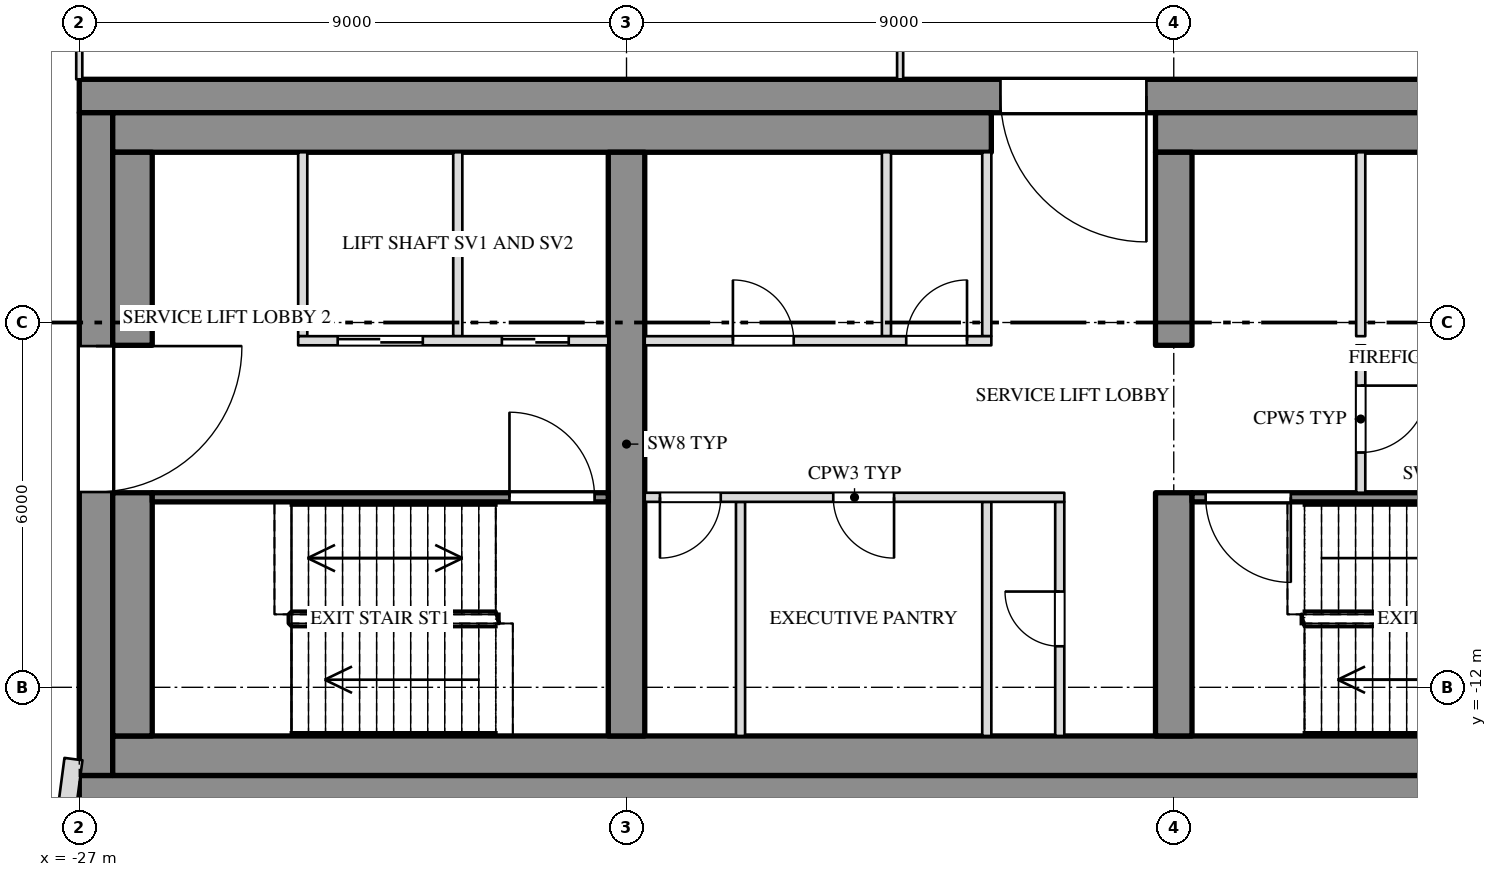
"""IFC4 building model, lengths in metres.
Left out: names, types, materials, properties, quantities, classifications, styles, units other than length and angle.
Written with IfcOpenShell. Run it as: python <this file> out.ifc"""

import sys

from ifc_helpers import new_model, si_unit, direction, frame, frame_2d, origin, place, context, subcontext, project, spatial, rectangle, extrude, element, fill, save


model = new_model("IFC4")
c1 = context("Model", 3, precision=1e-05, world=origin(), true_north=direction((0.0, 1.0)))
c2 = subcontext(c1, "Body", "Model", "MODEL_VIEW")
j1 = project(units=[si_unit("LENGTHUNIT", "METRE"), si_unit("PLANEANGLEUNIT", "RADIAN")], contexts=[c1])
p1 = place(None, origin())
s1 = spatial("IfcSite", under=j1, at=p1, CompositionType="ELEMENT")
p2 = place(p1, origin())
s2 = spatial("IfcBuilding", under=s1, at=p2, CompositionType="ELEMENT")
p3 = place(p2, frame((0.0, 0.0, 288.5)))
s3 = spatial("IfcBuildingStorey", under=s2, at=p3, CompositionType="ELEMENT", Elevation=288.5)
p4 = place(p3, frame((-27.0, -2.275, 0.0), z_axis=(0.0, 0.0, 1.0), x_axis=(1.0, 0.0, 0.0)))
e1 = element("IfcWall", 1, at=p4, inside=s3, PredefinedType="SHEAR", context=c2, shape_type="SweptSolid", body=[
    extrude(rectangle(XDim=54.0, YDim=0.55, at=frame_2d((27.0, 0.0))), origin(), (0.0, 0.0, 1.0), 3.78),
])
p5 = place(p4, frame((15.15, 0.0, 0.0)))
e2 = element("IfcOpeningElement", 2, at=p5, cuts=e1, PredefinedType="OPENING", context=c2, shape_type="SweptSolid", body=[
    extrude(rectangle(XDim=2.4, YDim=2.1, at=frame_2d((1.2, 1.05))), frame((0.0, 0.287, 0.0), z_axis=(0.0, -1.0, 0.0), x_axis=(1.0, 0.0, 0.0)), (0.0, 0.0, 1.0), 0.574),
])
p6 = place(p4, frame((36.45, 0.0, 0.0)))
e3 = element("IfcOpeningElement", 3, at=p6, cuts=e1, PredefinedType="OPENING", context=c2, shape_type="SweptSolid", body=[
    extrude(rectangle(XDim=2.4, YDim=2.1, at=frame_2d((1.2, 1.05))), frame((0.0, 0.287, 0.0), z_axis=(0.0, -1.0, 0.0), x_axis=(1.0, 0.0, 0.0)), (0.0, 0.0, 1.0), 0.574),
])
p7 = place(p3, frame((-27.0, -13.725, 0.0), z_axis=(0.0, 0.0, 1.0), x_axis=(1.0, 0.0, 0.0)))
e4 = element("IfcWall", 4, at=p7, inside=s3, PredefinedType="SHEAR", context=c2, shape_type="SweptSolid", body=[
    extrude(rectangle(XDim=54.0, YDim=0.55, at=frame_2d((27.0, 0.0))), origin(), (0.0, 0.0, 1.0), 3.78),
])
p8 = place(p3, frame((-26.725, -13.45, 0.0), z_axis=(0.0, 0.0, 1.0), x_axis=(0.0, 1.0, 0.0)))
e5 = element("IfcWall", 5, at=p8, inside=s3, PredefinedType="SHEAR", context=c2, shape_type="SweptSolid", body=[
    extrude(rectangle(XDim=10.9, YDim=0.55, at=frame_2d((5.45, 0.0))), origin(), (0.0, 0.0, 1.0), 3.78),
])
p9 = place(p8, frame((4.662, 0.0, 0.0)))
e6 = element("IfcOpeningElement", 6, at=p9, cuts=e5, PredefinedType="OPENING", context=c2, shape_type="SweptSolid", body=[
    extrude(rectangle(XDim=2.4, YDim=2.1, at=frame_2d((1.2, 1.05))), frame((0.0, 0.287, 0.0), z_axis=(0.0, -1.0, 0.0), x_axis=(1.0, 0.0, 0.0)), (0.0, 0.0, 1.0), 0.574),
])
p10 = place(p3, frame((-26.45, -2.875, 0.0), z_axis=(0.0, 0.0, 1.0), x_axis=(1.0, 0.0, 0.0)))
e7 = element("IfcWall", 7, at=p10, inside=s3, PredefinedType="SHEAR", context=c2, shape_type="SweptSolid", body=[
    extrude(rectangle(XDim=14.45, YDim=0.65, at=frame_2d((7.225, 0.0))), origin(), (0.0, 0.0, 1.0), 3.78),
])
p11 = place(p3, frame((-9.3, -2.875, 0.0), z_axis=(0.0, 0.0, 1.0), x_axis=(1.0, 0.0, 0.0)))
e8 = element("IfcWall", 8, at=p11, inside=s3, PredefinedType="SHEAR", context=c2, shape_type="SweptSolid", body=[
    extrude(rectangle(XDim=18.6, YDim=0.65, at=frame_2d((9.3, 0.0))), origin(), (0.0, 0.0, 1.0), 3.78),
])
p12 = place(p3, frame((-26.45, -13.125, 0.0), z_axis=(0.0, 0.0, 1.0), x_axis=(1.0, 0.0, 0.0)))
e9 = element("IfcWall", 9, at=p12, inside=s3, PredefinedType="SHEAR", context=c2, shape_type="SweptSolid", body=[
    extrude(rectangle(XDim=52.9, YDim=0.65, at=frame_2d((26.45, 0.0))), origin(), (0.0, 0.0, 1.0), 3.78),
])
p13 = place(p3, frame((-26.125, -12.8, 0.0), z_axis=(0.0, 0.0, 1.0), x_axis=(0.0, 1.0, 0.0)))
e10 = element("IfcWall", 10, at=p13, inside=s3, PredefinedType="SHEAR", context=c2, shape_type="SweptSolid", body=[
    extrude(rectangle(XDim=4.0, YDim=0.65, at=frame_2d((2.0, 0.0))), origin(), (0.0, 0.0, 1.0), 3.78),
])
p14 = place(p3, frame((-26.125, -6.375, 0.0), z_axis=(0.0, 0.0, 1.0), x_axis=(0.0, 1.0, 0.0)))
e11 = element("IfcWall", 11, at=p14, inside=s3, PredefinedType="SHEAR", context=c2, shape_type="SweptSolid", body=[
    extrude(rectangle(XDim=3.175, YDim=0.65, at=frame_2d((1.587, 0.0))), origin(), (0.0, 0.0, 1.0), 3.78),
])
p15 = place(p3, frame((-18.0, -12.8, 0.0), z_axis=(0.0, 0.0, 1.0), x_axis=(0.0, 1.0, 0.0)))
e12 = element("IfcWall", 12, at=p15, inside=s3, PredefinedType="SHEAR", context=c2, shape_type="SweptSolid", body=[
    extrude(rectangle(XDim=9.6, YDim=0.6, at=frame_2d((4.8, 0.0))), origin(), (0.0, 0.0, 1.0), 3.78),
])
p16 = place(p3, frame((-9.0, -12.8, 0.0), z_axis=(0.0, 0.0, 1.0), x_axis=(0.0, 1.0, 0.0)))
e13 = element("IfcWall", 13, at=p16, inside=s3, PredefinedType="SHEAR", context=c2, shape_type="SweptSolid", body=[
    extrude(rectangle(XDim=4.0, YDim=0.6, at=frame_2d((2.0, 0.0))), origin(), (0.0, 0.0, 1.0), 3.78),
])
p17 = place(p3, frame((-9.0, -6.375, 0.0), z_axis=(0.0, 0.0, 1.0), x_axis=(0.0, 1.0, 0.0)))
e14 = element("IfcWall", 14, at=p17, inside=s3, PredefinedType="SHEAR", context=c2, shape_type="SweptSolid", body=[
    extrude(rectangle(XDim=3.175, YDim=0.6, at=frame_2d((1.587, 0.0))), origin(), (0.0, 0.0, 1.0), 3.78),
])
p18 = place(p3, frame((-27.0, -2.0, 0.0), z_axis=(0.0, 0.0, 1.0), x_axis=(0.0, 1.0, 0.0)))
e15 = element("IfcWall", 15, at=p18, inside=s3, PredefinedType="PARTITIONING", context=c2, shape_type="SweptSolid", body=[
    extrude(rectangle(XDim=6.322, YDim=0.1, at=frame_2d((3.161, 0.0))), origin(), (0.0, 0.0, 1.0), 3.247),
])
p19 = place(p3, frame((-13.5, -2.0, 0.0), z_axis=(0.0, 0.0, 1.0), x_axis=(0.0, 1.0, 0.0)))
e16 = element("IfcWall", 16, at=p19, inside=s3, PredefinedType="PARTITIONING", context=c2, shape_type="SweptSolid", body=[
    extrude(rectangle(XDim=8.58, YDim=0.1, at=frame_2d((4.29, 0.0))), origin(), (0.0, 0.0, 1.0), 3.254),
])
p20 = place(p19, frame((3.85, 0.0, 0.0)))
e17 = element("IfcOpeningElement", 17, at=p20, cuts=e16, PredefinedType="OPENING", context=c2, shape_type="SweptSolid", body=[
    extrude(rectangle(XDim=0.9, YDim=2.1, at=frame_2d((0.45, 1.05))), frame((0.0, 0.062, 0.0), z_axis=(0.0, -1.0, 0.0), x_axis=(1.0, 0.0, 0.0)), (0.0, 0.0, 1.0), 0.124),
])
p21 = place(p3, frame((-27.296, -13.558, 0.0), z_axis=(0.0, 0.0, 1.0), x_axis=(0.991398522068, -0.130877692682, 0.0)))
e18 = element("IfcWall", 18, at=p21, inside=s3, PredefinedType="SOLIDWALL", context=c2, shape_type="SweptSolid", body=[
    extrude(rectangle(XDim=0.299, YDim=0.8, at=frame_2d((0.149, 0.0))), origin(), (0.0, 0.0, 1.0), 3.78),
])
for number, where, z_axis, x_axis in (
    (19, (-20.775, -6.225, 0.0), (0.0, 0.0, 1.0), (0.0, 1.0, 0.0)),
    (20, (-23.325, -6.225, 0.0), (0.0, 0.0, 1.0), (0.0, 1.0, 0.0)),
    (21, (-12.075, -6.225, 0.0), (0.0, 0.0, 1.0), (0.0, 1.0, 0.0)),
    (22, (-13.725, -6.225, 0.0), (0.0, 0.0, 1.0), (0.0, 1.0, 0.0)),
    (23, (-5.925, -6.225, 0.0), (0.0, 0.0, 1.0), (0.0, 1.0, 0.0)),
):
    element("IfcWall", number, at=place(p3, frame(where, z_axis=z_axis, x_axis=x_axis)), inside=s3, PredefinedType="PARTITIONING", context=c2, shape_type="SweptSolid", body=[
        extrude(rectangle(XDim=3.025, YDim=0.15, at=frame_2d((1.513, 0.0))), origin(), (0.0, 0.0, 1.0), 3.78),
    ])
p22 = place(p3, frame((-10.875, -12.8, 0.0), z_axis=(0.0, 0.0, 1.0), x_axis=(0.0, 1.0, 0.0)))
e24 = element("IfcWall", 24, at=p22, inside=s3, PredefinedType="PARTITIONING", context=c2, shape_type="SweptSolid", body=[
    extrude(rectangle(XDim=3.85, YDim=0.15, at=frame_2d((1.925, 0.0))), origin(), (0.0, 0.0, 1.0), 3.78),
])
p23 = place(p22, frame((1.475, 0.0, 0.0)))
e25 = element("IfcOpeningElement", 25, at=p23, cuts=e24, PredefinedType="OPENING", context=c2, shape_type="SweptSolid", body=[
    extrude(rectangle(XDim=0.9, YDim=2.1, at=frame_2d((0.45, 1.05))), frame((0.0, 0.087, 0.0), z_axis=(0.0, -1.0, 0.0), x_axis=(1.0, 0.0, 0.0)), (0.0, 0.0, 1.0), 0.174),
])
for number, where, z_axis, x_axis in (
    (26, (-12.075, -12.8, 0.0), (0.0, 0.0, 1.0), (0.0, 1.0, 0.0)),
    (27, (-16.125, -12.8, 0.0), (0.0, 0.0, 1.0), (0.0, 1.0, 0.0)),
):
    element("IfcWall", number, at=place(p3, frame(where, z_axis=z_axis, x_axis=x_axis)), inside=s3, PredefinedType="PARTITIONING", context=c2, shape_type="SweptSolid", body=[
        extrude(rectangle(XDim=3.85, YDim=0.15, at=frame_2d((1.925, 0.0))), origin(), (0.0, 0.0, 1.0), 3.78),
    ])
p24 = place(p3, frame((-5.925, -8.8, 0.0), z_axis=(0.0, 0.0, 1.0), x_axis=(0.0, 1.0, 0.0)))
e28 = element("IfcWall", 28, at=p24, inside=s3, PredefinedType="PARTITIONING", context=c2, shape_type="SweptSolid", body=[
    extrude(rectangle(XDim=2.425, YDim=0.15, at=frame_2d((1.212, 0.0))), origin(), (0.0, 0.0, 1.0), 3.78),
])
p25 = place(p24, frame((0.662, 0.0, 0.0)))
e29 = element("IfcOpeningElement", 29, at=p25, cuts=e28, PredefinedType="OPENING", context=c2, shape_type="SweptSolid", body=[
    extrude(rectangle(XDim=1.1, YDim=2.1, at=frame_2d((0.55, 1.05))), frame((0.0, 0.087, 0.0), z_axis=(0.0, -1.0, 0.0), x_axis=(1.0, 0.0, 0.0)), (0.0, 0.0, 1.0), 0.174),
])
p26 = place(p3, frame((-23.4, -6.3, 0.0), z_axis=(0.0, 0.0, 1.0), x_axis=(1.0, 0.0, 0.0)))
e30 = element("IfcWall", 30, at=p26, inside=s3, PredefinedType="PARTITIONING", context=c2, shape_type="SweptSolid", body=[
    extrude(rectangle(XDim=5.1, YDim=0.15, at=frame_2d((2.55, 0.0))), origin(), (0.0, 0.0, 1.0), 3.78),
])
p27 = place(p26, frame((0.65, 0.0, 0.0)))
e31 = element("IfcOpeningElement", 31, at=p27, cuts=e30, PredefinedType="OPENING", context=c2, shape_type="SweptSolid", body=[
    extrude(rectangle(XDim=1.4, YDim=2.1, at=frame_2d((0.7, 1.05))), frame((0.0, 0.087, 0.0), z_axis=(0.0, -1.0, 0.0), x_axis=(1.0, 0.0, 0.0)), (0.0, 0.0, 1.0), 0.174),
])
p28 = place(p26, frame((3.35, 0.0, 0.0)))
e32 = element("IfcOpeningElement", 32, at=p28, cuts=e30, PredefinedType="OPENING", context=c2, shape_type="SweptSolid", body=[
    extrude(rectangle(XDim=1.1, YDim=2.1, at=frame_2d((0.55, 1.05))), frame((0.0, 0.087, 0.0), z_axis=(0.0, -1.0, 0.0), x_axis=(1.0, 0.0, 0.0)), (0.0, 0.0, 1.0), 0.174),
])
p29 = place(p3, frame((-17.7, -6.3, 0.0), z_axis=(0.0, 0.0, 1.0), x_axis=(1.0, 0.0, 0.0)))
e33 = element("IfcWall", 33, at=p29, inside=s3, PredefinedType="PARTITIONING", context=c2, shape_type="SweptSolid", body=[
    extrude(rectangle(XDim=5.7, YDim=0.15, at=frame_2d((2.85, 0.0))), origin(), (0.0, 0.0, 1.0), 3.78),
])
p30 = place(p29, frame((1.45, 0.0, 0.0)))
e34 = element("IfcOpeningElement", 34, at=p30, cuts=e33, PredefinedType="OPENING", context=c2, shape_type="SweptSolid", body=[
    extrude(rectangle(XDim=1.0, YDim=2.1, at=frame_2d((0.5, 1.05))), frame((0.0, 0.087, 0.0), z_axis=(0.0, -1.0, 0.0), x_axis=(1.0, 0.0, 0.0)), (0.0, 0.0, 1.0), 0.174),
])
p31 = place(p29, frame((4.3, 0.0, 0.0)))
e35 = element("IfcOpeningElement", 35, at=p31, cuts=e33, PredefinedType="OPENING", context=c2, shape_type="SweptSolid", body=[
    extrude(rectangle(XDim=1.0, YDim=2.1, at=frame_2d((0.5, 1.05))), frame((0.0, 0.087, 0.0), z_axis=(0.0, -1.0, 0.0), x_axis=(1.0, 0.0, 0.0)), (0.0, 0.0, 1.0), 0.174),
])
p32 = place(p3, frame((-25.8, -8.875, 0.0), z_axis=(0.0, 0.0, 1.0), x_axis=(1.0, 0.0, 0.0)))
e36 = element("IfcWall", 36, at=p32, inside=s3, PredefinedType="SHEAR", context=c2, shape_type="SweptSolid", body=[
    extrude(rectangle(XDim=7.5, YDim=0.15, at=frame_2d((3.75, 0.0))), origin(), (0.0, 0.0, 1.0), 3.78),
])
p33 = place(p32, frame((5.875, 0.0, 0.0)))
e37 = element("IfcOpeningElement", 37, at=p33, cuts=e36, PredefinedType="OPENING", context=c2, shape_type="SweptSolid", body=[
    extrude(rectangle(XDim=1.4, YDim=2.1, at=frame_2d((0.7, 1.05))), frame((0.0, 0.087, 0.0), z_axis=(0.0, -1.0, 0.0), x_axis=(1.0, 0.0, 0.0)), (0.0, 0.0, 1.0), 0.174),
])
p34 = place(p3, frame((-17.7, -8.875, 0.0), z_axis=(0.0, 0.0, 1.0), x_axis=(1.0, 0.0, 0.0)))
e38 = element("IfcWall", 38, at=p34, inside=s3, PredefinedType="PARTITIONING", context=c2, shape_type="SweptSolid", body=[
    extrude(rectangle(XDim=6.9, YDim=0.15, at=frame_2d((3.45, 0.0))), origin(), (0.0, 0.0, 1.0), 3.78),
])
p35 = place(p34, frame((0.25, 0.0, 0.0)))
e39 = element("IfcOpeningElement", 39, at=p35, cuts=e38, PredefinedType="OPENING", context=c2, shape_type="SweptSolid", body=[
    extrude(rectangle(XDim=1.0, YDim=2.1, at=frame_2d((0.5, 1.05))), frame((0.0, 0.087, 0.0), z_axis=(0.0, -1.0, 0.0), x_axis=(1.0, 0.0, 0.0)), (0.0, 0.0, 1.0), 0.174),
])
p36 = place(p34, frame((3.1, 0.0, 0.0)))
e40 = element("IfcOpeningElement", 40, at=p36, cuts=e38, PredefinedType="OPENING", context=c2, shape_type="SweptSolid", body=[
    extrude(rectangle(XDim=1.0, YDim=2.1, at=frame_2d((0.5, 1.05))), frame((0.0, 0.087, 0.0), z_axis=(0.0, -1.0, 0.0), x_axis=(1.0, 0.0, 0.0)), (0.0, 0.0, 1.0), 0.174),
])
p37 = place(p3, frame((-8.7, -8.875, 0.0), z_axis=(0.0, 0.0, 1.0), x_axis=(1.0, 0.0, 0.0)))
e41 = element("IfcWall", 41, at=p37, inside=s3, PredefinedType="SHEAR", context=c2, shape_type="SweptSolid", body=[
    extrude(rectangle(XDim=8.4, YDim=0.15, at=frame_2d((4.2, 0.0))), origin(), (0.0, 0.0, 1.0), 3.78),
])
p38 = place(p37, frame((0.225, 0.0, 0.0)))
e42 = element("IfcOpeningElement", 42, at=p38, cuts=e41, PredefinedType="OPENING", context=c2, shape_type="SweptSolid", body=[
    extrude(rectangle(XDim=1.4, YDim=2.1, at=frame_2d((0.7, 1.05))), frame((0.0, 0.087, 0.0), z_axis=(0.0, -1.0, 0.0), x_axis=(1.0, 0.0, 0.0)), (0.0, 0.0, 1.0), 0.174),
])
p39 = place(p9, origin())
e43 = element("IfcDoor", 43, at=p39, inside=s3, OperationType="DOUBLE_DOOR_SINGLE_SWING", PredefinedType="DOOR", context=c2, shape_type="SweptSolid", body=[
    extrude(rectangle(XDim=2.4, YDim=2.1, at=frame_2d((1.2, 1.05))), frame((0.0, 0.025, 0.0), z_axis=(0.0, -1.0, 0.0), x_axis=(1.0, 0.0, 0.0)), (0.0, 0.0, 1.0), 0.05),
])
fill(e6, e43)
p40 = place(p27, origin())
e44 = element("IfcDoor", 44, at=p40, inside=s3, OperationType="SLIDING_TO_RIGHT", PredefinedType="DOOR", context=c2, shape_type="SweptSolid", body=[
    extrude(rectangle(XDim=1.4, YDim=2.1, at=frame_2d((0.7, 1.05))), frame((0.0, 0.025, 0.0), z_axis=(0.0, -1.0, 0.0), x_axis=(1.0, 0.0, 0.0)), (0.0, 0.0, 1.0), 0.05),
])
fill(e31, e44)
p41 = place(p28, origin())
e45 = element("IfcDoor", 45, at=p41, inside=s3, OperationType="SLIDING_TO_LEFT", PredefinedType="DOOR", context=c2, shape_type="SweptSolid", body=[
    extrude(rectangle(XDim=1.1, YDim=2.1, at=frame_2d((0.55, 1.05))), frame((0.0, 0.025, 0.0), z_axis=(0.0, -1.0, 0.0), x_axis=(1.0, 0.0, 0.0)), (0.0, 0.0, 1.0), 0.05),
])
fill(e32, e45)
p42 = place(p33, origin())
e46 = element("IfcDoor", 46, at=p42, inside=s3, OperationType="DOUBLE_DOOR_SINGLE_SWING", PredefinedType="DOOR", context=c2, shape_type="SweptSolid", body=[
    extrude(rectangle(XDim=1.4, YDim=2.1, at=frame_2d((0.7, 1.05))), frame((0.0, 0.025, 0.0), z_axis=(0.0, -1.0, 0.0), x_axis=(1.0, 0.0, 0.0)), (0.0, 0.0, 1.0), 0.05),
])
fill(e37, e46)
p43 = place(p35, origin())
e47 = element("IfcDoor", 47, at=p43, inside=s3, OperationType="SINGLE_SWING_RIGHT", PredefinedType="DOOR", context=c2, shape_type="SweptSolid", body=[
    extrude(rectangle(XDim=1.0, YDim=2.1, at=frame_2d((0.5, 1.05))), frame((0.0, 0.025, 0.0), z_axis=(0.0, -1.0, 0.0), x_axis=(1.0, 0.0, 0.0)), (0.0, 0.0, 1.0), 0.05),
])
fill(e39, e47)
p44 = place(p30, origin())
e48 = element("IfcDoor", 48, at=p44, inside=s3, OperationType="SINGLE_SWING_LEFT", PredefinedType="DOOR", context=c2, shape_type="SweptSolid", body=[
    extrude(rectangle(XDim=1.0, YDim=2.1, at=frame_2d((0.5, 1.05))), frame((0.0, 0.025, 0.0), z_axis=(0.0, -1.0, 0.0), x_axis=(1.0, 0.0, 0.0)), (0.0, 0.0, 1.0), 0.05),
])
fill(e34, e48)
p45 = place(p36, origin())
e49 = element("IfcDoor", 49, at=p45, inside=s3, OperationType="SINGLE_SWING_LEFT", PredefinedType="DOOR", context=c2, shape_type="SweptSolid", body=[
    extrude(rectangle(XDim=1.0, YDim=2.1, at=frame_2d((0.5, 1.05))), frame((0.0, 0.025, 0.0), z_axis=(0.0, -1.0, 0.0), x_axis=(1.0, 0.0, 0.0)), (0.0, 0.0, 1.0), 0.05),
])
fill(e40, e49)
p46 = place(p31, origin())
e50 = element("IfcDoor", 50, at=p46, inside=s3, OperationType="SINGLE_SWING_RIGHT", PredefinedType="DOOR", context=c2, shape_type="SweptSolid", body=[
    extrude(rectangle(XDim=1.0, YDim=2.1, at=frame_2d((0.5, 1.05))), frame((0.0, 0.025, 0.0), z_axis=(0.0, -1.0, 0.0), x_axis=(1.0, 0.0, 0.0)), (0.0, 0.0, 1.0), 0.05),
])
fill(e35, e50)
p47 = place(p23, origin())
e51 = element("IfcDoor", 51, at=p47, inside=s3, OperationType="SINGLE_SWING_RIGHT", PredefinedType="DOOR", context=c2, shape_type="SweptSolid", body=[
    extrude(rectangle(XDim=0.9, YDim=2.1, at=frame_2d((0.45, 1.05))), frame((0.0, 0.025, 0.0), z_axis=(0.0, -1.0, 0.0), x_axis=(1.0, 0.0, 0.0)), (0.0, 0.0, 1.0), 0.05),
])
fill(e25, e51)
p48 = place(p5, origin())
e52 = element("IfcDoor", 52, at=p48, inside=s3, OperationType="DOUBLE_DOOR_SINGLE_SWING", PredefinedType="DOOR", context=c2, shape_type="SweptSolid", body=[
    extrude(rectangle(XDim=2.4, YDim=2.1, at=frame_2d((1.2, 1.05))), frame((0.0, 0.025, 0.0), z_axis=(0.0, -1.0, 0.0), x_axis=(1.0, 0.0, 0.0)), (0.0, 0.0, 1.0), 0.05),
])
fill(e2, e52)
p49 = place(p38, origin())
e53 = element("IfcDoor", 53, at=p49, inside=s3, OperationType="DOUBLE_DOOR_SINGLE_SWING", PredefinedType="DOOR", context=c2, shape_type="SweptSolid", body=[
    extrude(rectangle(XDim=1.4, YDim=2.1, at=frame_2d((0.7, 1.05))), frame((0.0, 0.025, 0.0), z_axis=(0.0, -1.0, 0.0), x_axis=(1.0, 0.0, 0.0)), (0.0, 0.0, 1.0), 0.05),
])
fill(e42, e53)
p50 = place(p25, origin())
e54 = element("IfcDoor", 54, at=p50, inside=s3, OperationType="SINGLE_SWING_LEFT", PredefinedType="DOOR", context=c2, shape_type="SweptSolid", body=[
    extrude(rectangle(XDim=1.1, YDim=2.1, at=frame_2d((0.55, 1.05))), frame((0.0, 0.025, 0.0), z_axis=(0.0, -1.0, 0.0), x_axis=(1.0, 0.0, 0.0)), (0.0, 0.0, 1.0), 0.05),
])
fill(e29, e54)
save(model, sys.argv[1])
